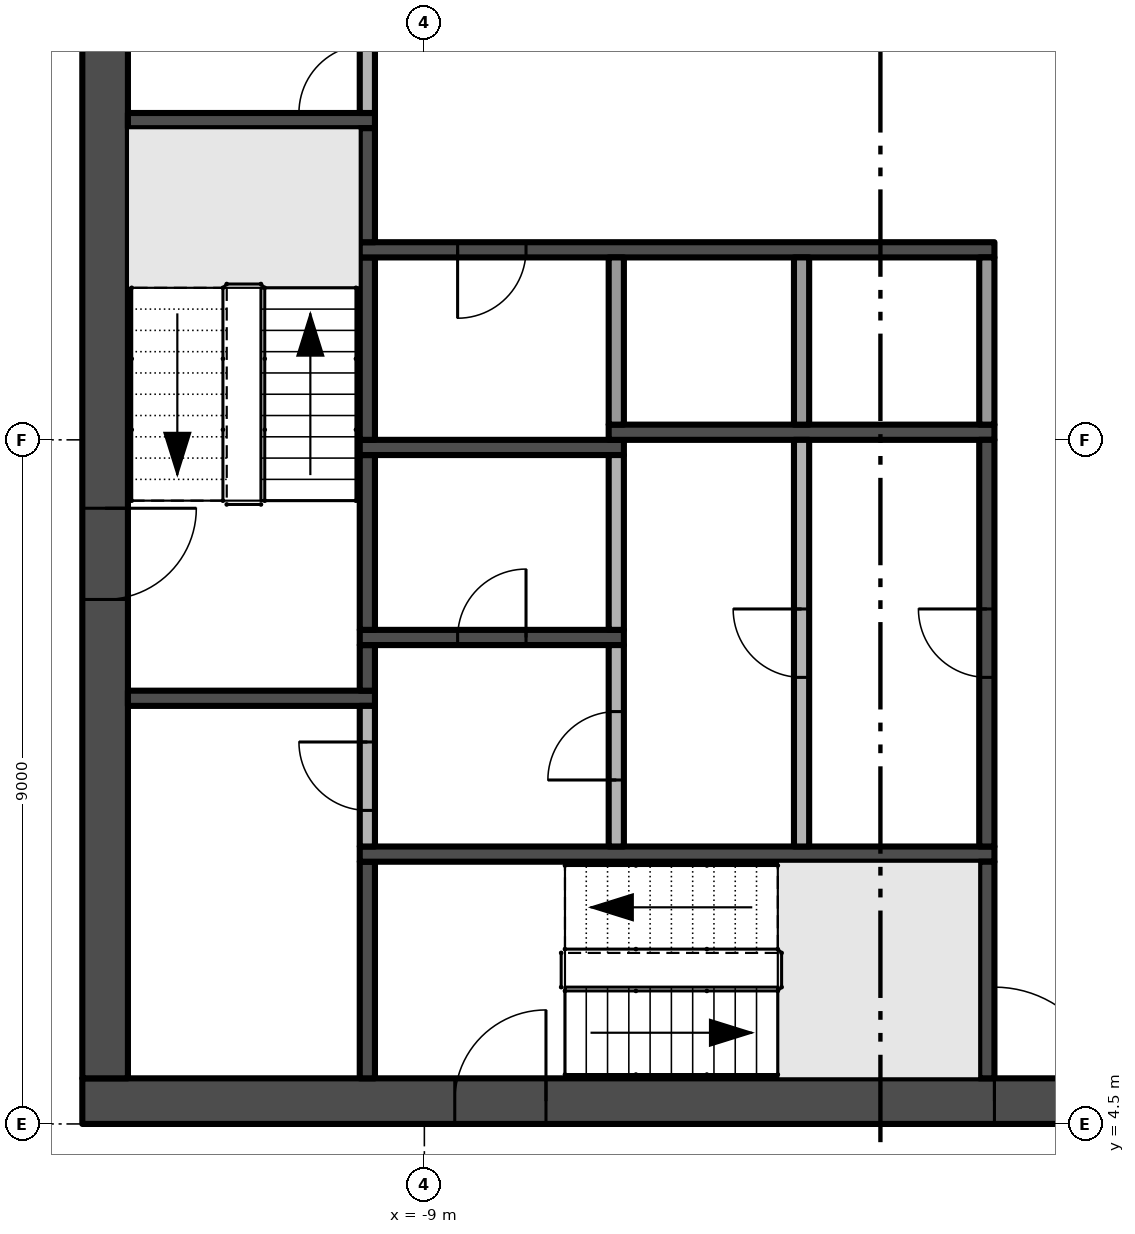
"""IFC4 building model, lengths in metres.
Left out: names, types, materials, properties, quantities, classifications, styles, units other than length and angle.
Written with IfcOpenShell. Run it as: python <this file> out.ifc"""

import sys

from ifc_helpers import new_model, si_unit, direction, frame, frame_2d, origin, place, context, subcontext, project, spatial, rectangle, extrude, element, fill, save


model = new_model("IFC4")
c1 = context("Model", 3, precision=1e-05, world=origin(), true_north=direction((0.0, 1.0)))
c2 = subcontext(c1, "Body", "Model", "MODEL_VIEW")
j1 = project(units=[si_unit("LENGTHUNIT", "METRE"), si_unit("PLANEANGLEUNIT", "RADIAN")], contexts=[c1])
p1 = place(None, origin())
s1 = spatial("IfcSite", under=j1, at=p1, CompositionType="ELEMENT")
p2 = place(p1, origin())
s2 = spatial("IfcBuilding", under=s1, at=p2, CompositionType="ELEMENT")
p3 = place(p2, frame((0.0, 0.0, 238.8)))
s3 = spatial("IfcBuildingStorey", under=s2, at=p3, CompositionType="ELEMENT", Elevation=238.8)
p4 = place(p3, frame((-13.5, 4.8, -0.3), z_axis=(0.0, 0.0, 1.0), x_axis=(1.0, 0.0, 0.0)))
e1 = element("IfcWall", 1, at=p4, inside=s3, PredefinedType="SHEAR", context=c2, shape_type="SweptSolid", body=[
    extrude(rectangle(XDim=27.0, YDim=0.6, at=frame_2d((13.5, 0.0))), origin(), (0.0, 0.0, 1.0), 3.8),
])
p5 = place(p4, frame((12.0, 0.0, 0.3)))
e2 = element("IfcOpeningElement", 2, at=p5, cuts=e1, PredefinedType="OPENING", context=c2, shape_type="SweptSolid", body=[
    extrude(rectangle(XDim=3.0, YDim=2.4, at=frame_2d((1.5, 1.2))), frame((0.0, 0.31, 0.0), z_axis=(0.0, -1.0, 0.0), x_axis=(1.0, 0.0, 0.0)), (0.0, 0.0, 1.0), 0.62),
])
p6 = place(p4, frame((4.9, 0.0, 0.3)))
e3 = element("IfcOpeningElement", 3, at=p6, cuts=e1, PredefinedType="OPENING", context=c2, shape_type="SweptSolid", body=[
    extrude(rectangle(XDim=1.2, YDim=2.2, at=frame_2d((0.6, 1.1))), frame((0.0, 0.31, 0.0), z_axis=(0.0, -1.0, 0.0), x_axis=(1.0, 0.0, 0.0)), (0.0, 0.0, 1.0), 0.62),
])
p7 = place(p4, frame((20.75, 0.0, 0.3)))
e4 = element("IfcOpeningElement", 4, at=p7, cuts=e1, PredefinedType="OPENING", context=c2, shape_type="SweptSolid", body=[
    extrude(rectangle(XDim=1.5, YDim=2.2, at=frame_2d((0.75, 1.1))), frame((0.0, 0.31, 0.0), z_axis=(0.0, -1.0, 0.0), x_axis=(1.0, 0.0, 0.0)), (0.0, 0.0, 1.0), 0.62),
])
p8 = place(p4, frame((17.4, 0.0, 0.3)))
e5 = element("IfcOpeningElement", 5, at=p8, cuts=e1, PredefinedType="OPENING", context=c2, shape_type="SweptSolid", body=[
    extrude(rectangle(XDim=1.2, YDim=2.2, at=frame_2d((0.6, 1.1))), frame((0.0, 0.31, 0.0), z_axis=(0.0, -1.0, 0.0), x_axis=(1.0, 0.0, 0.0)), (0.0, 0.0, 1.0), 0.62),
])
p9 = place(p3, frame((-13.2, 21.9, -0.3), z_axis=(0.0, 0.0, 1.0), x_axis=(0.0, -1.0, 0.0)))
e6 = element("IfcWall", 6, at=p9, inside=s3, PredefinedType="SHEAR", context=c2, shape_type="SweptSolid", body=[
    extrude(rectangle(XDim=16.8, YDim=0.6, at=frame_2d((8.4, 0.0))), origin(), (0.0, 0.0, 1.0), 3.8),
])
p10 = place(p9, frame((9.3, 0.0, 0.3)))
e7 = element("IfcOpeningElement", 7, at=p10, cuts=e6, PredefinedType="OPENING", context=c2, shape_type="SweptSolid", body=[
    extrude(rectangle(XDim=1.2, YDim=2.2, at=frame_2d((0.6, 1.1))), frame((0.0, 0.31, 0.0), z_axis=(0.0, -1.0, 0.0), x_axis=(1.0, 0.0, 0.0)), (0.0, 0.0, 1.0), 0.62),
])
for number, where, z_axis, x_axis in (
    (8, (-12.9, 10.1, 0.0), (0.0, 0.0, 1.0), (1.0, 0.0, 0.0)),
    (9, (-12.9, 17.7, 0.0), (0.0, 0.0, 1.0), (1.0, 0.0, 0.0)),
):
    element("IfcWall", number, at=place(p3, frame(where, z_axis=z_axis, x_axis=x_axis)), inside=s3, PredefinedType="SHEAR", context=c2, shape_type="SweptSolid", body=[
        extrude(rectangle(XDim=3.25, YDim=0.2, at=frame_2d((1.625, 0.0))), origin(), (0.0, 0.0, 1.0), 3.5),
    ])
p11 = place(p3, frame((-9.75, 5.1, 0.0), z_axis=(0.0, 0.0, 1.0), x_axis=(0.0, 1.0, 0.0)))
e10 = element("IfcWall", 10, at=p11, inside=s3, PredefinedType="SHEAR", context=c2, shape_type="SweptSolid", body=[
    extrude(rectangle(XDim=2.85, YDim=0.2, at=frame_2d((1.425, 0.0))), origin(), (0.0, 0.0, 1.0), 3.5),
])
p12 = place(p3, frame((-9.85, 8.05, 0.0), z_axis=(0.0, 0.0, 1.0), x_axis=(1.0, 0.0, 0.0)))
e11 = element("IfcWall", 11, at=p12, inside=s3, PredefinedType="SHEAR", context=c2, shape_type="SweptSolid", body=[
    extrude(rectangle(XDim=8.35, YDim=0.2, at=frame_2d((4.175, 0.0))), origin(), (0.0, 0.0, 1.0), 3.5),
])
p13 = place(p3, frame((-9.75, 8.15, 0.0), z_axis=(0.0, 0.0, 1.0), x_axis=(0.0, 1.0, 0.0)))
e12 = element("IfcWall", 12, at=p13, inside=s3, PredefinedType="PARTITIONING", context=c2, shape_type="SweptSolid", body=[
    extrude(rectangle(XDim=1.85, YDim=0.2, at=frame_2d((0.925, 0.0))), origin(), (0.0, 0.0, 1.0), 3.5),
])
p14 = place(p13, frame((0.475, 0.0, 0.0)))
e13 = element("IfcOpeningElement", 13, at=p14, cuts=e12, PredefinedType="OPENING", context=c2, shape_type="SweptSolid", body=[
    extrude(rectangle(XDim=0.9, YDim=2.1, at=frame_2d((0.45, 1.05))), frame((0.0, 0.11, 0.0), z_axis=(0.0, -1.0, 0.0), x_axis=(1.0, 0.0, 0.0)), (0.0, 0.0, 1.0), 0.22),
])
p15 = place(p3, frame((-9.75, 10.2, 0.0), z_axis=(0.0, 0.0, 1.0), x_axis=(0.0, 1.0, 0.0)))
e14 = element("IfcWall", 14, at=p15, inside=s3, PredefinedType="SHEAR", context=c2, shape_type="SweptSolid", body=[
    extrude(rectangle(XDim=0.6, YDim=0.2, at=frame_2d((0.3, 0.0))), origin(), (0.0, 0.0, 1.0), 3.5),
])
p16 = place(p3, frame((-9.85, 10.9, 0.0), z_axis=(0.0, 0.0, 1.0), x_axis=(1.0, 0.0, 0.0)))
e15 = element("IfcWall", 15, at=p16, inside=s3, PredefinedType="SHEAR", context=c2, shape_type="SweptSolid", body=[
    extrude(rectangle(XDim=3.475, YDim=0.2, at=frame_2d((1.738, 0.0))), origin(), (0.0, 0.0, 1.0), 3.5),
])
p17 = place(p16, frame((1.288, 0.0, 0.0)))
e16 = element("IfcOpeningElement", 16, at=p17, cuts=e15, PredefinedType="OPENING", context=c2, shape_type="SweptSolid", body=[
    extrude(rectangle(XDim=0.9, YDim=2.1, at=frame_2d((0.45, 1.05))), frame((0.0, 0.11, 0.0), z_axis=(0.0, -1.0, 0.0), x_axis=(1.0, 0.0, 0.0)), (0.0, 0.0, 1.0), 0.22),
])
p18 = place(p3, frame((-9.75, 11.0, 0.0), z_axis=(0.0, 0.0, 1.0), x_axis=(0.0, 1.0, 0.0)))
e17 = element("IfcWall", 17, at=p18, inside=s3, PredefinedType="SHEAR", context=c2, shape_type="SweptSolid", body=[
    extrude(rectangle(XDim=2.3, YDim=0.2, at=frame_2d((1.15, 0.0))), origin(), (0.0, 0.0, 1.0), 3.5),
])
p19 = place(p3, frame((-9.85, 13.4, 0.0), z_axis=(0.0, 0.0, 1.0), x_axis=(1.0, 0.0, 0.0)))
e18 = element("IfcWall", 18, at=p19, inside=s3, PredefinedType="SHEAR", context=c2, shape_type="SweptSolid", body=[
    extrude(rectangle(XDim=3.475, YDim=0.2, at=frame_2d((1.738, 0.0))), origin(), (0.0, 0.0, 1.0), 3.5),
])
p20 = place(p3, frame((-9.75, 13.5, 0.0), z_axis=(0.0, 0.0, 1.0), x_axis=(0.0, 1.0, 0.0)))
e19 = element("IfcWall", 19, at=p20, inside=s3, PredefinedType="SHEAR", context=c2, shape_type="SweptSolid", body=[
    extrude(rectangle(XDim=2.4, YDim=0.2, at=frame_2d((1.2, 0.0))), origin(), (0.0, 0.0, 1.0), 3.5),
])
p21 = place(p3, frame((-1.5, 16.0, 0.0), z_axis=(0.0, 0.0, 1.0), x_axis=(-1.0, 0.0, 0.0)))
e20 = element("IfcWall", 20, at=p21, inside=s3, PredefinedType="SHEAR", context=c2, shape_type="SweptSolid", body=[
    extrude(rectangle(XDim=8.35, YDim=0.2, at=frame_2d((4.175, 0.0))), origin(), (0.0, 0.0, 1.0), 3.5),
])
p22 = place(p21, frame((6.162, 0.0, 0.0)))
e21 = element("IfcOpeningElement", 21, at=p22, cuts=e20, PredefinedType="OPENING", context=c2, shape_type="SweptSolid", body=[
    extrude(rectangle(XDim=0.9, YDim=2.1, at=frame_2d((0.45, 1.05))), frame((0.0, 0.11, 0.0), z_axis=(0.0, -1.0, 0.0), x_axis=(1.0, 0.0, 0.0)), (0.0, 0.0, 1.0), 0.22),
])
p23 = place(p3, frame((-9.75, 16.1, 0.0), z_axis=(0.0, 0.0, 1.0), x_axis=(0.0, 1.0, 0.0)))
e22 = element("IfcWall", 22, at=p23, inside=s3, PredefinedType="SHEAR", context=c2, shape_type="SweptSolid", body=[
    extrude(rectangle(XDim=1.5, YDim=0.2, at=frame_2d((0.75, 0.0))), origin(), (0.0, 0.0, 1.0), 3.5),
])
p24 = place(p3, frame((-9.75, 17.8, 0.0), z_axis=(0.0, 0.0, 1.0), x_axis=(0.0, 1.0, 0.0)))
e23 = element("IfcWall", 23, at=p24, inside=s3, PredefinedType="PARTITIONING", context=c2, shape_type="SweptSolid", body=[
    extrude(rectangle(XDim=1.4, YDim=0.2, at=frame_2d((0.7, 0.0))), origin(), (0.0, 0.0, 1.0), 3.5),
])
p25 = place(p24, origin())
e24 = element("IfcOpeningElement", 24, at=p25, cuts=e23, PredefinedType="OPENING", context=c2, shape_type="SweptSolid", body=[
    extrude(rectangle(XDim=0.9, YDim=2.1, at=frame_2d((0.45, 1.05))), frame((0.0, 0.11, 0.0), z_axis=(0.0, -1.0, 0.0), x_axis=(1.0, 0.0, 0.0)), (0.0, 0.0, 1.0), 0.22),
])
p26 = place(p3, frame((-6.475, 8.15, 0.0), z_axis=(0.0, 0.0, 1.0), x_axis=(0.0, 1.0, 0.0)))
e25 = element("IfcWall", 25, at=p26, inside=s3, PredefinedType="PARTITIONING", context=c2, shape_type="SweptSolid", body=[
    extrude(rectangle(XDim=2.65, YDim=0.2, at=frame_2d((1.325, 0.0))), origin(), (0.0, 0.0, 1.0), 3.5),
])
p27 = place(p26, frame((0.875, 0.0, 0.0)))
e26 = element("IfcOpeningElement", 26, at=p27, cuts=e25, PredefinedType="OPENING", context=c2, shape_type="SweptSolid", body=[
    extrude(rectangle(XDim=0.9, YDim=2.1, at=frame_2d((0.45, 1.05))), frame((0.0, 0.11, 0.0), z_axis=(0.0, -1.0, 0.0), x_axis=(1.0, 0.0, 0.0)), (0.0, 0.0, 1.0), 0.22),
])
p28 = place(p3, frame((-6.475, 11.0, 0.0), z_axis=(0.0, 0.0, 1.0), x_axis=(0.0, 1.0, 0.0)))
e27 = element("IfcWall", 27, at=p28, inside=s3, PredefinedType="PARTITIONING", context=c2, shape_type="SweptSolid", body=[
    extrude(rectangle(XDim=2.3, YDim=0.2, at=frame_2d((1.15, 0.0))), origin(), (0.0, 0.0, 1.0), 3.5),
])
p29 = place(p3, frame((-6.575, 13.6, 0.0), z_axis=(0.0, 0.0, 1.0), x_axis=(1.0, 0.0, 0.0)))
e28 = element("IfcWall", 28, at=p29, inside=s3, PredefinedType="SHEAR", context=c2, shape_type="SweptSolid", body=[
    extrude(rectangle(XDim=5.075, YDim=0.2, at=frame_2d((2.538, 0.0))), origin(), (0.0, 0.0, 1.0), 3.5),
])
p30 = place(p3, frame((-6.475, 13.7, 0.0), z_axis=(0.0, 0.0, 1.0), x_axis=(0.0, 1.0, 0.0)))
e29 = element("IfcWall", 29, at=p30, inside=s3, PredefinedType="PARTITIONING", context=c2, shape_type="SweptSolid", body=[
    extrude(rectangle(XDim=2.2, YDim=0.2, at=frame_2d((1.1, 0.0))), origin(), (0.0, 0.0, 1.0), 3.5),
])
p31 = place(p3, frame((-4.037, 8.15, 0.0), z_axis=(0.0, 0.0, 1.0), x_axis=(0.0, 1.0, 0.0)))
e30 = element("IfcWall", 30, at=p31, inside=s3, PredefinedType="PARTITIONING", context=c2, shape_type="SweptSolid", body=[
    extrude(rectangle(XDim=5.35, YDim=0.2, at=frame_2d((2.675, 0.0))), origin(), (0.0, 0.0, 1.0), 3.5),
])
p32 = place(p31, frame((2.225, 0.0, 0.0)))
e31 = element("IfcOpeningElement", 31, at=p32, cuts=e30, PredefinedType="OPENING", context=c2, shape_type="SweptSolid", body=[
    extrude(rectangle(XDim=0.9, YDim=2.1, at=frame_2d((0.45, 1.05))), frame((0.0, 0.11, 0.0), z_axis=(0.0, -1.0, 0.0), x_axis=(1.0, 0.0, 0.0)), (0.0, 0.0, 1.0), 0.22),
])
p33 = place(p3, frame((-4.037, 13.7, 0.0), z_axis=(0.0, 0.0, 1.0), x_axis=(0.0, 1.0, 0.0)))
e32 = element("IfcWall", 32, at=p33, inside=s3, PredefinedType="PARTITIONING", context=c2, shape_type="SweptSolid", body=[
    extrude(rectangle(XDim=2.2, YDim=0.2, at=frame_2d((1.1, 0.0))), origin(), (0.0, 0.0, 1.0), 3.5),
])
p34 = place(p3, frame((-1.6, 5.1, 0.0), z_axis=(0.0, 0.0, 1.0), x_axis=(0.0, 1.0, 0.0)))
e33 = element("IfcWall", 33, at=p34, inside=s3, PredefinedType="SHEAR", context=c2, shape_type="SweptSolid", body=[
    extrude(rectangle(XDim=2.85, YDim=0.2, at=frame_2d((1.425, 0.0))), origin(), (0.0, 0.0, 1.0), 3.5),
])
p35 = place(p3, frame((-1.6, 8.15, 0.0), z_axis=(0.0, 0.0, 1.0), x_axis=(0.0, 1.0, 0.0)))
e34 = element("IfcWall", 34, at=p35, inside=s3, PredefinedType="SHEAR", context=c2, shape_type="SweptSolid", body=[
    extrude(rectangle(XDim=5.35, YDim=0.2, at=frame_2d((2.675, 0.0))), origin(), (0.0, 0.0, 1.0), 3.5),
])
p36 = place(p35, frame((2.225, 0.0, 0.0)))
e35 = element("IfcOpeningElement", 35, at=p36, cuts=e34, PredefinedType="OPENING", context=c2, shape_type="SweptSolid", body=[
    extrude(rectangle(XDim=0.9, YDim=2.1, at=frame_2d((0.45, 1.05))), frame((0.0, 0.11, 0.0), z_axis=(0.0, -1.0, 0.0), x_axis=(1.0, 0.0, 0.0)), (0.0, 0.0, 1.0), 0.22),
])
p37 = place(p3, frame((-1.6, 13.7, 0.0), z_axis=(0.0, 0.0, 1.0), x_axis=(0.0, 1.0, 0.0)))
e36 = element("IfcWall", 36, at=p37, inside=s3, PredefinedType="PARTITIONING", context=c2, shape_type="SweptSolid", body=[
    extrude(rectangle(XDim=2.2, YDim=0.2, at=frame_2d((1.1, 0.0))), origin(), (0.0, 0.0, 1.0), 3.5),
])
p38 = place(p5, frame((3.0, 0.0, 0.0), z_axis=(0.0, 0.0, 1.0), x_axis=(-1.0, 0.0, 0.0)))
e37 = element("IfcDoor", 37, at=p38, inside=s3, OperationType="DOUBLE_DOOR_SINGLE_SWING", PredefinedType="DOOR", context=c2, shape_type="SweptSolid", body=[
    extrude(rectangle(XDim=3.0, YDim=2.4, at=frame_2d((1.5, 1.2))), frame((0.0, 0.025, 0.0), z_axis=(0.0, -1.0, 0.0), x_axis=(1.0, 0.0, 0.0)), (0.0, 0.0, 1.0), 0.05),
])
fill(e2, e37)
p39 = place(p10, frame((1.2, 0.0, 0.0), z_axis=(0.0, 0.0, 1.0), x_axis=(-1.0, 0.0, 0.0)))
e38 = element("IfcDoor", 38, at=p39, inside=s3, OperationType="SINGLE_SWING_RIGHT", PredefinedType="DOOR", context=c2, shape_type="SweptSolid", body=[
    extrude(rectangle(XDim=1.2, YDim=2.2, at=frame_2d((0.6, 1.1))), frame((0.0, 0.025, 0.0), z_axis=(0.0, -1.0, 0.0), x_axis=(1.0, 0.0, 0.0)), (0.0, 0.0, 1.0), 0.05),
])
fill(e7, e38)
p40 = place(p6, frame((1.2, 0.0, 0.0), z_axis=(0.0, 0.0, 1.0), x_axis=(-1.0, 0.0, 0.0)))
e39 = element("IfcDoor", 39, at=p40, inside=s3, OperationType="SINGLE_SWING_LEFT", PredefinedType="DOOR", context=c2, shape_type="SweptSolid", body=[
    extrude(rectangle(XDim=1.2, YDim=2.2, at=frame_2d((0.6, 1.1))), frame((0.0, 0.025, 0.0), z_axis=(0.0, -1.0, 0.0), x_axis=(1.0, 0.0, 0.0)), (0.0, 0.0, 1.0), 0.05),
])
fill(e3, e39)
p41 = place(p22, origin())
e40 = element("IfcDoor", 40, at=p41, inside=s3, OperationType="SINGLE_SWING_RIGHT", PredefinedType="DOOR", context=c2, shape_type="SweptSolid", body=[
    extrude(rectangle(XDim=0.9, YDim=2.1, at=frame_2d((0.45, 1.05))), frame((0.0, 0.025, 0.0), z_axis=(0.0, -1.0, 0.0), x_axis=(1.0, 0.0, 0.0)), (0.0, 0.0, 1.0), 0.05),
])
fill(e21, e40)
p42 = place(p36, origin())
e41 = element("IfcDoor", 41, at=p42, inside=s3, OperationType="SINGLE_SWING_RIGHT", PredefinedType="DOOR", context=c2, shape_type="SweptSolid", body=[
    extrude(rectangle(XDim=0.9, YDim=2.1, at=frame_2d((0.45, 1.05))), frame((0.0, 0.025, 0.0), z_axis=(0.0, -1.0, 0.0), x_axis=(1.0, 0.0, 0.0)), (0.0, 0.0, 1.0), 0.05),
])
fill(e35, e41)
p43 = place(p25, origin())
e42 = element("IfcDoor", 42, at=p43, inside=s3, OperationType="SINGLE_SWING_LEFT", PredefinedType="DOOR", context=c2, shape_type="SweptSolid", body=[
    extrude(rectangle(XDim=0.9, YDim=2.1, at=frame_2d((0.45, 1.05))), frame((0.0, 0.025, 0.0), z_axis=(0.0, -1.0, 0.0), x_axis=(1.0, 0.0, 0.0)), (0.0, 0.0, 1.0), 0.05),
])
fill(e24, e42)
p44 = place(p32, origin())
e43 = element("IfcDoor", 43, at=p44, inside=s3, OperationType="SINGLE_SWING_RIGHT", PredefinedType="DOOR", context=c2, shape_type="SweptSolid", body=[
    extrude(rectangle(XDim=0.9, YDim=2.1, at=frame_2d((0.45, 1.05))), frame((0.0, 0.025, 0.0), z_axis=(0.0, -1.0, 0.0), x_axis=(1.0, 0.0, 0.0)), (0.0, 0.0, 1.0), 0.05),
])
fill(e31, e43)
p45 = place(p27, origin())
e44 = element("IfcDoor", 44, at=p45, inside=s3, OperationType="SINGLE_SWING_LEFT", PredefinedType="DOOR", context=c2, shape_type="SweptSolid", body=[
    extrude(rectangle(XDim=0.9, YDim=2.1, at=frame_2d((0.45, 1.05))), frame((0.0, 0.025, 0.0), z_axis=(0.0, -1.0, 0.0), x_axis=(1.0, 0.0, 0.0)), (0.0, 0.0, 1.0), 0.05),
])
fill(e26, e44)
p46 = place(p17, origin())
e45 = element("IfcDoor", 45, at=p46, inside=s3, OperationType="SINGLE_SWING_RIGHT", PredefinedType="DOOR", context=c2, shape_type="SweptSolid", body=[
    extrude(rectangle(XDim=0.9, YDim=2.1, at=frame_2d((0.45, 1.05))), frame((0.0, 0.025, 0.0), z_axis=(0.0, -1.0, 0.0), x_axis=(1.0, 0.0, 0.0)), (0.0, 0.0, 1.0), 0.05),
])
fill(e16, e45)
p47 = place(p14, origin())
e46 = element("IfcDoor", 46, at=p47, inside=s3, OperationType="SINGLE_SWING_RIGHT", PredefinedType="DOOR", context=c2, shape_type="SweptSolid", body=[
    extrude(rectangle(XDim=0.9, YDim=2.1, at=frame_2d((0.45, 1.05))), frame((0.0, 0.025, 0.0), z_axis=(0.0, -1.0, 0.0), x_axis=(1.0, 0.0, 0.0)), (0.0, 0.0, 1.0), 0.05),
])
fill(e13, e46)
save(model, sys.argv[1])
